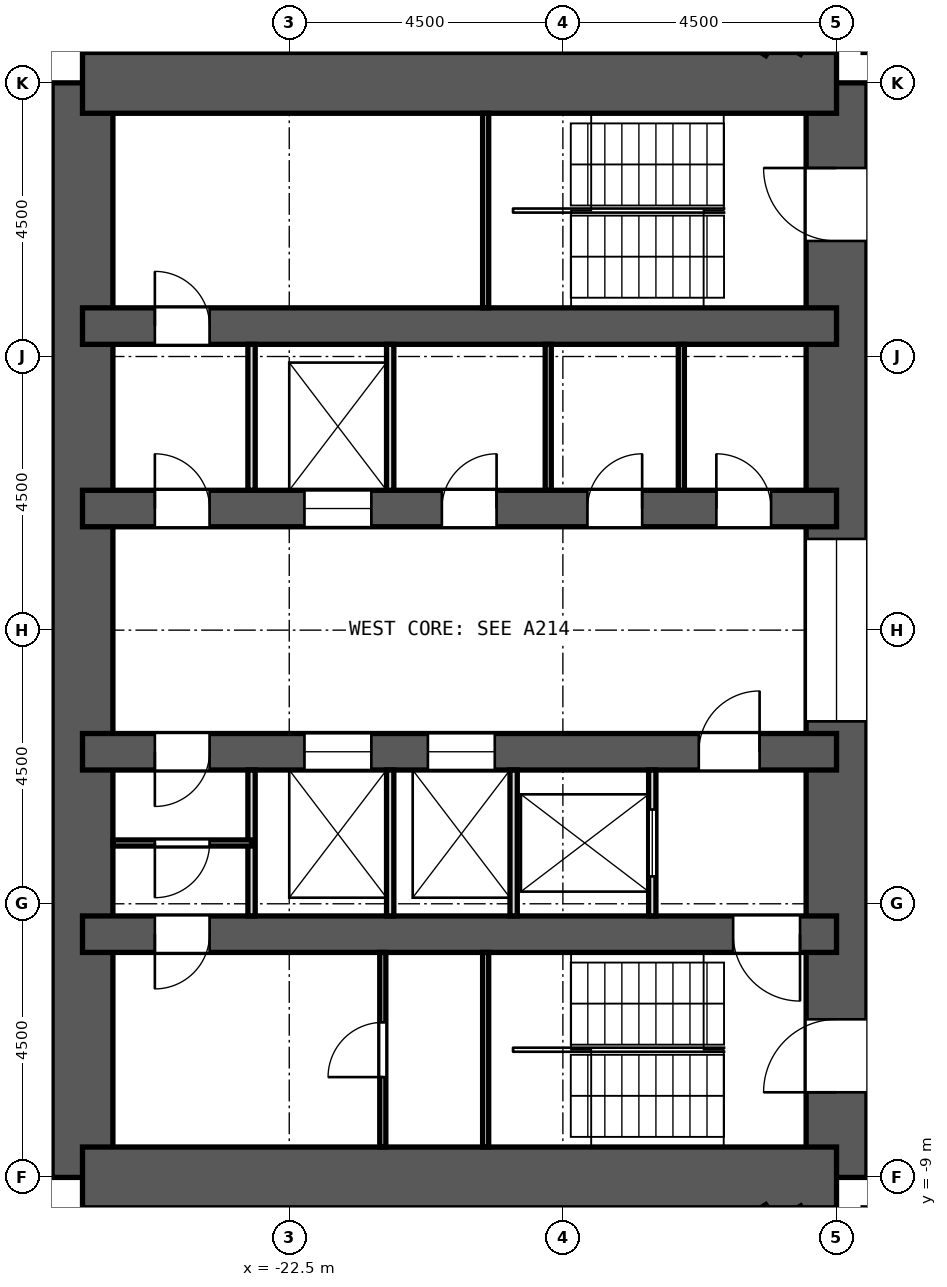
"""IFC4 building model, lengths in metres.
Left out: names, types, materials, properties, quantities, classifications, styles, units other than length and angle.
Written with IfcOpenShell. Run it as: python <this file> out.ifc"""

import sys

from ifc_helpers import new_model, si_unit, direction, frame, frame_2d, origin, place, context, subcontext, project, spatial, rectangle, extrude, element, fill, save


model = new_model("IFC4")
c1 = context("Model", 3, precision=1e-05, world=origin(), true_north=direction((0.0, 1.0)))
c2 = subcontext(c1, "Body", "Model", "MODEL_VIEW")
j1 = project(units=[si_unit("LENGTHUNIT", "METRE"), si_unit("PLANEANGLEUNIT", "RADIAN")], contexts=[c1])
p1 = place(None, origin())
s1 = spatial("IfcSite", under=j1, at=p1, CompositionType="ELEMENT")
p2 = place(p1, origin())
s2 = spatial("IfcBuilding", under=s1, at=p2, CompositionType="ELEMENT")
p3 = place(p2, frame((0.0, 0.0, 75.8)))
s3 = spatial("IfcBuildingStorey", under=s2, at=p3, CompositionType="ELEMENT", Elevation=75.8)
p4 = place(p3, frame((-13.5, -9.0, 0.0), z_axis=(0.0, 0.0, 1.0), x_axis=(0.0, 1.0, 0.0)))
e1 = element("IfcWall", 1, at=p4, inside=s3, PredefinedType="SHEAR", context=c2, shape_type="SweptSolid", body=[
    extrude(rectangle(XDim=18.0, YDim=1.0, at=frame_2d((9.0, 0.0))), origin(), (0.0, 0.0, 1.0), 3.3),
])
p5 = place(p4, frame((15.4, 0.0, 0.0)))
e2 = element("IfcOpeningElement", 2, at=p5, cuts=e1, PredefinedType="OPENING", context=c2, shape_type="SweptSolid", body=[
    extrude(rectangle(XDim=1.2, YDim=2.1, at=frame_2d((0.6, 1.05))), frame((0.0, 0.512, 0.0), z_axis=(0.0, -1.0, 0.0), x_axis=(1.0, 0.0, 0.0)), (0.0, 0.0, 1.0), 1.024),
])
p6 = place(p4, frame((1.4, 0.0, 0.0)))
e3 = element("IfcOpeningElement", 3, at=p6, cuts=e1, PredefinedType="OPENING", context=c2, shape_type="SweptSolid", body=[
    extrude(rectangle(XDim=1.2, YDim=2.1, at=frame_2d((0.6, 1.05))), frame((0.0, 0.512, 0.0), z_axis=(0.0, -1.0, 0.0), x_axis=(1.0, 0.0, 0.0)), (0.0, 0.0, 1.0), 1.024),
])
p7 = place(p4, frame((7.5, 0.0, 0.0)))
e4 = element("IfcOpeningElement", 4, at=p7, cuts=e1, PredefinedType="OPENING", context=c2, shape_type="SweptSolid", body=[
    extrude(rectangle(XDim=3.0, YDim=2.4, at=frame_2d((1.5, 1.2))), frame((0.0, 0.512, 0.0), z_axis=(0.0, -1.0, 0.0), x_axis=(1.0, 0.0, 0.0)), (0.0, 0.0, 1.0), 1.024),
])
p8 = place(p3, frame((-25.9, -9.0, 0.0), z_axis=(0.0, 0.0, 1.0), x_axis=(0.0, 1.0, 0.0)))
e5 = element("IfcWall", 5, at=p8, inside=s3, PredefinedType="SHEAR", context=c2, shape_type="SweptSolid", body=[
    extrude(rectangle(XDim=18.0, YDim=1.0, at=frame_2d((9.0, 0.0))), origin(), (0.0, 0.0, 1.0), 3.3),
])
for number, where, z_axis, x_axis in (
    (6, (-13.5, 9.0, 0.0), (0.0, 0.0, 1.0), (-1.0, 0.0, 0.0)),
    (7, (-13.5, -9.0, 0.0), (0.0, 0.0, 1.0), (-1.0, 0.0, 0.0)),
):
    element("IfcWall", number, at=place(p3, frame(where, z_axis=z_axis, x_axis=x_axis)), inside=s3, PredefinedType="SHEAR", context=c2, shape_type="SweptSolid", body=[
        extrude(rectangle(XDim=12.4, YDim=1.0, at=frame_2d((6.2, 0.0))), origin(), (0.0, 0.0, 1.0), 3.3),
    ])
p9 = place(p3, frame((-13.5, 5.0, 0.0), z_axis=(0.0, 0.0, 1.0), x_axis=(-1.0, 0.0, 0.0)))
e8 = element("IfcWall", 8, at=p9, inside=s3, PredefinedType="SHEAR", context=c2, shape_type="SweptSolid", body=[
    extrude(rectangle(XDim=12.4, YDim=0.6, at=frame_2d((6.2, 0.0))), origin(), (0.0, 0.0, 1.0), 3.3),
])
p10 = place(p9, frame((10.31, 0.0, 0.0)))
e9 = element("IfcOpeningElement", 9, at=p10, cuts=e8, PredefinedType="OPENING", context=c2, shape_type="SweptSolid", body=[
    extrude(rectangle(XDim=0.9, YDim=2.1, at=frame_2d((0.45, 1.05))), frame((0.0, 0.312, 0.0), z_axis=(0.0, -1.0, 0.0), x_axis=(1.0, 0.0, 0.0)), (0.0, 0.0, 1.0), 0.624),
])
p11 = place(p3, frame((-13.5, -5.0, 0.0), z_axis=(0.0, 0.0, 1.0), x_axis=(-1.0, 0.0, 0.0)))
e10 = element("IfcWall", 10, at=p11, inside=s3, PredefinedType="SHEAR", context=c2, shape_type="SweptSolid", body=[
    extrude(rectangle(XDim=12.4, YDim=0.6, at=frame_2d((6.2, 0.0))), origin(), (0.0, 0.0, 1.0), 3.3),
])
p12 = place(p11, frame((10.31, 0.0, 0.0)))
e11 = element("IfcOpeningElement", 11, at=p12, cuts=e10, PredefinedType="OPENING", context=c2, shape_type="SweptSolid", body=[
    extrude(rectangle(XDim=0.9, YDim=2.1, at=frame_2d((0.45, 1.05))), frame((0.0, 0.312, 0.0), z_axis=(0.0, -1.0, 0.0), x_axis=(1.0, 0.0, 0.0)), (0.0, 0.0, 1.0), 0.624),
])
p13 = place(p11, frame((0.6, 0.0, 0.0)))
e12 = element("IfcOpeningElement", 12, at=p13, cuts=e10, PredefinedType="OPENING", context=c2, shape_type="SweptSolid", body=[
    extrude(rectangle(XDim=1.1, YDim=2.1, at=frame_2d((0.55, 1.05))), frame((0.0, 0.312, 0.0), z_axis=(0.0, -1.0, 0.0), x_axis=(1.0, 0.0, 0.0)), (0.0, 0.0, 1.0), 0.624),
])
p14 = place(p3, frame((-13.5, 2.0, 0.0), z_axis=(0.0, 0.0, 1.0), x_axis=(-1.0, 0.0, 0.0)))
e13 = element("IfcWall", 13, at=p14, inside=s3, PredefinedType="SHEAR", context=c2, shape_type="SweptSolid", body=[
    extrude(rectangle(XDim=12.4, YDim=0.6, at=frame_2d((6.2, 0.0))), origin(), (0.0, 0.0, 1.0), 3.3),
])
p15 = place(p14, frame((7.65, 0.0, 0.0)))
e14 = element("IfcOpeningElement", 14, at=p15, cuts=e13, PredefinedType="OPENING", context=c2, shape_type="SweptSolid", body=[
    extrude(rectangle(XDim=1.1, YDim=2.1, at=frame_2d((0.55, 1.05))), frame((0.0, 0.312, 0.0), z_axis=(0.0, -1.0, 0.0), x_axis=(1.0, 0.0, 0.0)), (0.0, 0.0, 1.0), 0.624),
])
p16 = place(p14, frame((1.076, 0.0, 0.0)))
e15 = element("IfcOpeningElement", 15, at=p16, cuts=e13, PredefinedType="OPENING", context=c2, shape_type="SweptSolid", body=[
    extrude(rectangle(XDim=0.9, YDim=2.1, at=frame_2d((0.45, 1.05))), frame((0.0, 0.312, 0.0), z_axis=(0.0, -1.0, 0.0), x_axis=(1.0, 0.0, 0.0)), (0.0, 0.0, 1.0), 0.624),
])
p17 = place(p14, frame((3.196, 0.0, 0.0)))
e16 = element("IfcOpeningElement", 16, at=p17, cuts=e13, PredefinedType="OPENING", context=c2, shape_type="SweptSolid", body=[
    extrude(rectangle(XDim=0.9, YDim=2.1, at=frame_2d((0.45, 1.05))), frame((0.0, 0.312, 0.0), z_axis=(0.0, -1.0, 0.0), x_axis=(1.0, 0.0, 0.0)), (0.0, 0.0, 1.0), 0.624),
])
p18 = place(p14, frame((5.59, 0.0, 0.0)))
e17 = element("IfcOpeningElement", 17, at=p18, cuts=e13, PredefinedType="OPENING", context=c2, shape_type="SweptSolid", body=[
    extrude(rectangle(XDim=0.9, YDim=2.1, at=frame_2d((0.45, 1.05))), frame((0.0, 0.312, 0.0), z_axis=(0.0, -1.0, 0.0), x_axis=(1.0, 0.0, 0.0)), (0.0, 0.0, 1.0), 0.624),
])
p19 = place(p14, frame((10.31, 0.0, 0.0)))
e18 = element("IfcOpeningElement", 18, at=p19, cuts=e13, PredefinedType="OPENING", context=c2, shape_type="SweptSolid", body=[
    extrude(rectangle(XDim=0.9, YDim=2.1, at=frame_2d((0.45, 1.05))), frame((0.0, 0.312, 0.0), z_axis=(0.0, -1.0, 0.0), x_axis=(1.0, 0.0, 0.0)), (0.0, 0.0, 1.0), 0.624),
])
p20 = place(p3, frame((-13.5, -2.0, 0.0), z_axis=(0.0, 0.0, 1.0), x_axis=(-1.0, 0.0, 0.0)))
e19 = element("IfcWall", 19, at=p20, inside=s3, PredefinedType="SHEAR", context=c2, shape_type="SweptSolid", body=[
    extrude(rectangle(XDim=12.4, YDim=0.6, at=frame_2d((6.2, 0.0))), origin(), (0.0, 0.0, 1.0), 3.3),
])
p21 = place(p20, frame((5.62, 0.0, 0.0)))
e20 = element("IfcOpeningElement", 20, at=p21, cuts=e19, PredefinedType="OPENING", context=c2, shape_type="SweptSolid", body=[
    extrude(rectangle(XDim=1.1, YDim=2.1, at=frame_2d((0.55, 1.05))), frame((0.0, 0.312, 0.0), z_axis=(0.0, -1.0, 0.0), x_axis=(1.0, 0.0, 0.0)), (0.0, 0.0, 1.0), 0.624),
])
p22 = place(p20, frame((7.65, 0.0, 0.0)))
e21 = element("IfcOpeningElement", 21, at=p22, cuts=e19, PredefinedType="OPENING", context=c2, shape_type="SweptSolid", body=[
    extrude(rectangle(XDim=1.1, YDim=2.1, at=frame_2d((0.55, 1.05))), frame((0.0, 0.312, 0.0), z_axis=(0.0, -1.0, 0.0), x_axis=(1.0, 0.0, 0.0)), (0.0, 0.0, 1.0), 0.624),
])
p23 = place(p20, frame((1.265, 0.0, 0.0)))
e22 = element("IfcOpeningElement", 22, at=p23, cuts=e19, PredefinedType="OPENING", context=c2, shape_type="SweptSolid", body=[
    extrude(rectangle(XDim=1.0, YDim=2.1, at=frame_2d((0.5, 1.05))), frame((0.0, 0.312, 0.0), z_axis=(0.0, -1.0, 0.0), x_axis=(1.0, 0.0, 0.0)), (0.0, 0.0, 1.0), 0.624),
])
p24 = place(p20, frame((10.31, 0.0, 0.0)))
e23 = element("IfcOpeningElement", 23, at=p24, cuts=e19, PredefinedType="OPENING", context=c2, shape_type="SweptSolid", body=[
    extrude(rectangle(XDim=0.9, YDim=2.1, at=frame_2d((0.45, 1.05))), frame((0.0, 0.312, 0.0), z_axis=(0.0, -1.0, 0.0), x_axis=(1.0, 0.0, 0.0)), (0.0, 0.0, 1.0), 0.624),
])
for number, where, z_axis, x_axis in (
    (24, (-26.208, 11.585, 0.0), (0.0, 0.0, 1.0), (-0.342, -0.94, 0.0)),
    (25, (-27.523, -7.971, 0.0), (0.0, 0.0, 1.0), (0.342, -0.94, 0.0)),
):
    element("IfcWall", number, at=place(p3, frame(where, z_axis=z_axis, x_axis=x_axis)), inside=s3, PredefinedType="SOLIDWALL", context=c2, shape_type="SweptSolid", body=[
        extrude(rectangle(XDim=3.846, YDim=0.6, at=frame_2d((1.923, 0.0))), origin(), (0.0, 0.0, 1.0), 2.75),
    ])
p25 = place(p3, frame((-14.145, -9.5, 0.0), z_axis=(0.0, 0.0, 1.0), x_axis=(0.500012531179, -0.866018168784, 0.0)))
e26 = element("IfcWall", 26, at=p25, inside=s3, PredefinedType="PARTITIONING", context=c2, shape_type="SweptSolid", body=[
    extrude(rectangle(XDim=2.21, YDim=0.125, at=frame_2d((1.105, 0.0))), origin(), (0.0, 0.0, 1.0), 2.75),
])
p26 = place(p3, frame((-16.293, 10.58, 0.0), z_axis=(0.0, 0.0, 1.0), x_axis=(0.838803325008, -0.544434552499, 0.0)))
e27 = element("IfcWall", 27, at=p26, inside=s3, PredefinedType="PARTITIONING", context=c2, shape_type="SweptSolid", body=[
    extrude(rectangle(XDim=1.984, YDim=0.125, at=frame_2d((0.992, 0.0))), origin(), (0.0, 0.0, 1.0), 2.75),
])
p27 = place(p3, frame((-16.24, -10.546, 0.0), z_axis=(0.0, 0.0, 1.0), x_axis=(0.838829547553, 0.544394149631, 0.0)))
e28 = element("IfcWall", 28, at=p27, inside=s3, PredefinedType="PARTITIONING", context=c2, shape_type="SweptSolid", body=[
    extrude(rectangle(XDim=1.921, YDim=0.125, at=frame_2d((0.96, 0.0))), origin(), (0.0, 0.0, 1.0), 2.75),
])
p28 = place(p3, frame((-14.145, 9.5, 0.0), z_axis=(0.0, 0.0, 1.0), x_axis=(0.500012531179, 0.866018168784, 0.0)))
e29 = element("IfcWall", 29, at=p28, inside=s3, PredefinedType="PARTITIONING", context=c2, shape_type="SweptSolid", body=[
    extrude(rectangle(XDim=2.21, YDim=0.125, at=frame_2d((1.105, 0.0))), origin(), (0.0, 0.0, 1.0), 2.75),
])
for number, where, z_axis, x_axis in (
    (30, (-16.052, 2.3, 0.0), (0.0, 0.0, 1.0), (0.0, 1.0, 0.0)),
    (31, (-18.241, 2.3, 0.0), (0.0, 0.0, 1.0), (0.0, 1.0, 0.0)),
):
    element("IfcWall", number, at=place(p3, frame(where, z_axis=z_axis, x_axis=x_axis)), inside=s3, PredefinedType="PARTITIONING", context=c2, shape_type="SweptSolid", body=[
        extrude(rectangle(XDim=2.4, YDim=0.1, at=frame_2d((1.2, 0.0))), origin(), (0.0, 0.0, 1.0), 2.75),
    ])
for number, where, z_axis, x_axis in (
    (32, (-20.84, 2.3, 0.0), (0.0, 0.0, 1.0), (0.0, 1.0, 0.0)),
    (33, (-23.12, 2.3, 0.0), (0.0, 0.0, 1.0), (0.0, 1.0, 0.0)),
):
    element("IfcWall", number, at=place(p3, frame(where, z_axis=z_axis, x_axis=x_axis)), inside=s3, PredefinedType="PARTITIONING", context=c2, shape_type="SweptSolid", body=[
        extrude(rectangle(XDim=2.4, YDim=0.12, at=frame_2d((1.2, 0.0))), origin(), (0.0, 0.0, 1.0), 2.75),
    ])
p29 = place(p3, frame((-16.53, -4.7, 0.0), z_axis=(0.0, 0.0, 1.0), x_axis=(0.0, 1.0, 0.0)))
e34 = element("IfcWall", 34, at=p29, inside=s3, PredefinedType="PARTITIONING", context=c2, shape_type="SweptSolid", body=[
    extrude(rectangle(XDim=2.4, YDim=0.12, at=frame_2d((1.2, 0.0))), origin(), (0.0, 0.0, 1.0), 2.75),
])
p30 = place(p29, frame((0.65, 0.0, 0.0)))
e35 = element("IfcOpeningElement", 35, at=p30, cuts=e34, PredefinedType="OPENING", context=c2, shape_type="SweptSolid", body=[
    extrude(rectangle(XDim=1.1, YDim=2.1, at=frame_2d((0.55, 1.05))), frame((0.0, 0.072, 0.0), z_axis=(0.0, -1.0, 0.0), x_axis=(1.0, 0.0, 0.0)), (0.0, 0.0, 1.0), 0.144),
])
for number, where, z_axis, x_axis in (
    (36, (-18.81, -4.7, 0.0), (0.0, 0.0, 1.0), (0.0, 1.0, 0.0)),
    (37, (-20.84, -4.7, 0.0), (0.0, 0.0, 1.0), (0.0, 1.0, 0.0)),
    (38, (-23.12, -4.7, 0.0), (0.0, 0.0, 1.0), (0.0, 1.0, 0.0)),
):
    element("IfcWall", number, at=place(p3, frame(where, z_axis=z_axis, x_axis=x_axis)), inside=s3, PredefinedType="PARTITIONING", context=c2, shape_type="SweptSolid", body=[
        extrude(rectangle(XDim=2.4, YDim=0.12, at=frame_2d((1.2, 0.0))), origin(), (0.0, 0.0, 1.0), 2.75),
    ])
p31 = place(p3, frame((-23.12, -3.5, 0.0), z_axis=(0.0, 0.0, 1.0), x_axis=(-1.0, 0.0, 0.0)))
e39 = element("IfcWall", 39, at=p31, inside=s3, PredefinedType="PARTITIONING", context=c2, shape_type="SweptSolid", body=[
    extrude(rectangle(XDim=2.28, YDim=0.1, at=frame_2d((1.14, 0.0))), origin(), (0.0, 0.0, 1.0), 2.75),
])
p32 = place(p31, frame((0.69, 0.0, 0.0)))
e40 = element("IfcOpeningElement", 40, at=p32, cuts=e39, PredefinedType="OPENING", context=c2, shape_type="SweptSolid", body=[
    extrude(rectangle(XDim=0.9, YDim=2.1, at=frame_2d((0.45, 1.05))), frame((0.0, 0.062, 0.0), z_axis=(0.0, -1.0, 0.0), x_axis=(1.0, 0.0, 0.0)), (0.0, 0.0, 1.0), 0.124),
])
for number, where, z_axis, x_axis in (
    (41, (-19.27, 5.3, 0.0), (0.0, 0.0, 1.0), (0.0, 1.0, 0.0)),
    (42, (-19.27, -8.5, 0.0), (0.0, 0.0, 1.0), (0.0, 1.0, 0.0)),
):
    element("IfcWall", number, at=place(p3, frame(where, z_axis=z_axis, x_axis=x_axis)), inside=s3, PredefinedType="PARTITIONING", context=c2, shape_type="SweptSolid", body=[
        extrude(rectangle(XDim=3.2, YDim=0.1, at=frame_2d((1.6, 0.0))), origin(), (0.0, 0.0, 1.0), 2.75),
    ])
p33 = place(p3, frame((-20.962, -8.5, 0.0), z_axis=(0.0, 0.0, 1.0), x_axis=(0.0, 1.0, 0.0)))
e43 = element("IfcWall", 43, at=p33, inside=s3, PredefinedType="PARTITIONING", context=c2, shape_type="SweptSolid", body=[
    extrude(rectangle(XDim=3.2, YDim=0.1, at=frame_2d((1.6, 0.0))), origin(), (0.0, 0.0, 1.0), 2.75),
])
p34 = place(p33, frame((1.15, 0.0, 0.0)))
e44 = element("IfcOpeningElement", 44, at=p34, cuts=e43, PredefinedType="OPENING", context=c2, shape_type="SweptSolid", body=[
    extrude(rectangle(XDim=0.9, YDim=2.1, at=frame_2d((0.45, 1.05))), frame((0.0, 0.062, 0.0), z_axis=(0.0, -1.0, 0.0), x_axis=(1.0, 0.0, 0.0)), (0.0, 0.0, 1.0), 0.124),
])
p35 = place(p15, origin())
e45 = element("IfcDoor", 45, at=p35, inside=s3, OperationType="DOUBLE_DOOR_SLIDING", PredefinedType="DOOR", context=c2, shape_type="SweptSolid", body=[
    extrude(rectangle(XDim=1.1, YDim=2.1, at=frame_2d((0.55, 1.05))), frame((0.0, 0.025, 0.0), z_axis=(0.0, -1.0, 0.0), x_axis=(1.0, 0.0, 0.0)), (0.0, 0.0, 1.0), 0.05),
])
fill(e14, e45)
p36 = place(p30, origin())
e46 = element("IfcDoor", 46, at=p36, inside=s3, OperationType="DOUBLE_DOOR_SLIDING", PredefinedType="DOOR", context=c2, shape_type="SweptSolid", body=[
    extrude(rectangle(XDim=1.1, YDim=2.1, at=frame_2d((0.55, 1.05))), frame((0.0, 0.025, 0.0), z_axis=(0.0, -1.0, 0.0), x_axis=(1.0, 0.0, 0.0)), (0.0, 0.0, 1.0), 0.05),
])
fill(e35, e46)
p37 = place(p21, origin())
e47 = element("IfcDoor", 47, at=p37, inside=s3, OperationType="DOUBLE_DOOR_SLIDING", PredefinedType="DOOR", context=c2, shape_type="SweptSolid", body=[
    extrude(rectangle(XDim=1.1, YDim=2.1, at=frame_2d((0.55, 1.05))), frame((0.0, 0.025, 0.0), z_axis=(0.0, -1.0, 0.0), x_axis=(1.0, 0.0, 0.0)), (0.0, 0.0, 1.0), 0.05),
])
fill(e20, e47)
p38 = place(p22, origin())
e48 = element("IfcDoor", 48, at=p38, inside=s3, OperationType="DOUBLE_DOOR_SLIDING", PredefinedType="DOOR", context=c2, shape_type="SweptSolid", body=[
    extrude(rectangle(XDim=1.1, YDim=2.1, at=frame_2d((0.55, 1.05))), frame((0.0, 0.025, 0.0), z_axis=(0.0, -1.0, 0.0), x_axis=(1.0, 0.0, 0.0)), (0.0, 0.0, 1.0), 0.05),
])
fill(e21, e48)
p39 = place(p16, frame((0.9, 0.0, 0.0), z_axis=(0.0, 0.0, 1.0), x_axis=(-1.0, 0.0, 0.0)))
e49 = element("IfcDoor", 49, at=p39, inside=s3, OperationType="SINGLE_SWING_LEFT", PredefinedType="DOOR", context=c2, shape_type="SweptSolid", body=[
    extrude(rectangle(XDim=0.9, YDim=2.1, at=frame_2d((0.45, 1.05))), frame((0.0, 0.025, 0.0), z_axis=(0.0, -1.0, 0.0), x_axis=(1.0, 0.0, 0.0)), (0.0, 0.0, 1.0), 0.05),
])
fill(e15, e49)
p40 = place(p17, frame((0.9, 0.0, 0.0), z_axis=(0.0, 0.0, 1.0), x_axis=(-1.0, 0.0, 0.0)))
e50 = element("IfcDoor", 50, at=p40, inside=s3, OperationType="SINGLE_SWING_RIGHT", PredefinedType="DOOR", context=c2, shape_type="SweptSolid", body=[
    extrude(rectangle(XDim=0.9, YDim=2.1, at=frame_2d((0.45, 1.05))), frame((0.0, 0.025, 0.0), z_axis=(0.0, -1.0, 0.0), x_axis=(1.0, 0.0, 0.0)), (0.0, 0.0, 1.0), 0.05),
])
fill(e16, e50)
p41 = place(p18, frame((0.9, 0.0, 0.0), z_axis=(0.0, 0.0, 1.0), x_axis=(-1.0, 0.0, 0.0)))
e51 = element("IfcDoor", 51, at=p41, inside=s3, OperationType="SINGLE_SWING_RIGHT", PredefinedType="DOOR", context=c2, shape_type="SweptSolid", body=[
    extrude(rectangle(XDim=0.9, YDim=2.1, at=frame_2d((0.45, 1.05))), frame((0.0, 0.025, 0.0), z_axis=(0.0, -1.0, 0.0), x_axis=(1.0, 0.0, 0.0)), (0.0, 0.0, 1.0), 0.05),
])
fill(e17, e51)
p42 = place(p19, frame((0.9, 0.0, 0.0), z_axis=(0.0, 0.0, 1.0), x_axis=(-1.0, 0.0, 0.0)))
e52 = element("IfcDoor", 52, at=p42, inside=s3, OperationType="SINGLE_SWING_LEFT", PredefinedType="DOOR", context=c2, shape_type="SweptSolid", body=[
    extrude(rectangle(XDim=0.9, YDim=2.1, at=frame_2d((0.45, 1.05))), frame((0.0, 0.025, 0.0), z_axis=(0.0, -1.0, 0.0), x_axis=(1.0, 0.0, 0.0)), (0.0, 0.0, 1.0), 0.05),
])
fill(e18, e52)
p43 = place(p23, frame((1.0, 0.0, 0.0), z_axis=(0.0, 0.0, 1.0), x_axis=(-1.0, 0.0, 0.0)))
e53 = element("IfcDoor", 53, at=p43, inside=s3, OperationType="SINGLE_SWING_RIGHT", PredefinedType="DOOR", context=c2, shape_type="SweptSolid", body=[
    extrude(rectangle(XDim=1.0, YDim=2.1, at=frame_2d((0.5, 1.05))), frame((0.0, 0.025, 0.0), z_axis=(0.0, -1.0, 0.0), x_axis=(1.0, 0.0, 0.0)), (0.0, 0.0, 1.0), 0.05),
])
fill(e22, e53)
p44 = place(p24, origin())
e54 = element("IfcDoor", 54, at=p44, inside=s3, OperationType="SINGLE_SWING_RIGHT", PredefinedType="DOOR", context=c2, shape_type="SweptSolid", body=[
    extrude(rectangle(XDim=0.9, YDim=2.1, at=frame_2d((0.45, 1.05))), frame((0.0, 0.025, 0.0), z_axis=(0.0, -1.0, 0.0), x_axis=(1.0, 0.0, 0.0)), (0.0, 0.0, 1.0), 0.05),
])
fill(e23, e54)
p45 = place(p10, frame((0.9, 0.0, 0.0), z_axis=(0.0, 0.0, 1.0), x_axis=(-1.0, 0.0, 0.0)))
e55 = element("IfcDoor", 55, at=p45, inside=s3, OperationType="SINGLE_SWING_LEFT", PredefinedType="DOOR", context=c2, shape_type="SweptSolid", body=[
    extrude(rectangle(XDim=0.9, YDim=2.1, at=frame_2d((0.45, 1.05))), frame((0.0, 0.025, 0.0), z_axis=(0.0, -1.0, 0.0), x_axis=(1.0, 0.0, 0.0)), (0.0, 0.0, 1.0), 0.05),
])
fill(e9, e55)
p46 = place(p32, origin())
e56 = element("IfcDoor", 56, at=p46, inside=s3, OperationType="SINGLE_SWING_RIGHT", PredefinedType="DOOR", context=c2, shape_type="SweptSolid", body=[
    extrude(rectangle(XDim=0.9, YDim=2.1, at=frame_2d((0.45, 1.05))), frame((0.0, 0.025, 0.0), z_axis=(0.0, -1.0, 0.0), x_axis=(1.0, 0.0, 0.0)), (0.0, 0.0, 1.0), 0.05),
])
fill(e40, e56)
p47 = place(p34, origin())
e57 = element("IfcDoor", 57, at=p47, inside=s3, OperationType="SINGLE_SWING_LEFT", PredefinedType="DOOR", context=c2, shape_type="SweptSolid", body=[
    extrude(rectangle(XDim=0.9, YDim=2.1, at=frame_2d((0.45, 1.05))), frame((0.0, 0.025, 0.0), z_axis=(0.0, -1.0, 0.0), x_axis=(1.0, 0.0, 0.0)), (0.0, 0.0, 1.0), 0.05),
])
fill(e44, e57)
p48 = place(p12, origin())
e58 = element("IfcDoor", 58, at=p48, inside=s3, OperationType="SINGLE_SWING_RIGHT", PredefinedType="DOOR", context=c2, shape_type="SweptSolid", body=[
    extrude(rectangle(XDim=0.9, YDim=2.1, at=frame_2d((0.45, 1.05))), frame((0.0, 0.025, 0.0), z_axis=(0.0, -1.0, 0.0), x_axis=(1.0, 0.0, 0.0)), (0.0, 0.0, 1.0), 0.05),
])
fill(e11, e58)
p49 = place(p13, origin())
e59 = element("IfcDoor", 59, at=p49, inside=s3, OperationType="SINGLE_SWING_LEFT", PredefinedType="DOOR", context=c2, shape_type="SweptSolid", body=[
    extrude(rectangle(XDim=1.1, YDim=2.1, at=frame_2d((0.55, 1.05))), frame((0.0, 0.025, 0.0), z_axis=(0.0, -1.0, 0.0), x_axis=(1.0, 0.0, 0.0)), (0.0, 0.0, 1.0), 0.05),
])
fill(e12, e59)
p50 = place(p5, origin())
e60 = element("IfcDoor", 60, at=p50, inside=s3, OperationType="SINGLE_SWING_RIGHT", PredefinedType="DOOR", context=c2, shape_type="SweptSolid", body=[
    extrude(rectangle(XDim=1.2, YDim=2.1, at=frame_2d((0.6, 1.05))), frame((0.0, 0.025, 0.0), z_axis=(0.0, -1.0, 0.0), x_axis=(1.0, 0.0, 0.0)), (0.0, 0.0, 1.0), 0.05),
])
fill(e2, e60)
p51 = place(p6, origin())
e61 = element("IfcDoor", 61, at=p51, inside=s3, OperationType="SINGLE_SWING_LEFT", PredefinedType="DOOR", context=c2, shape_type="SweptSolid", body=[
    extrude(rectangle(XDim=1.2, YDim=2.1, at=frame_2d((0.6, 1.05))), frame((0.0, 0.025, 0.0), z_axis=(0.0, -1.0, 0.0), x_axis=(1.0, 0.0, 0.0)), (0.0, 0.0, 1.0), 0.05),
])
fill(e3, e61)
p52 = place(p7, origin())
e62 = element("IfcDoor", 62, at=p52, inside=s3, OperationType="DOUBLE_DOOR_SLIDING", PredefinedType="DOOR", context=c2, shape_type="SweptSolid", body=[
    extrude(rectangle(XDim=3.0, YDim=2.4, at=frame_2d((1.5, 1.2))), frame((0.0, 0.025, 0.0), z_axis=(0.0, -1.0, 0.0), x_axis=(1.0, 0.0, 0.0)), (0.0, 0.0, 1.0), 0.05),
])
fill(e4, e62)
save(model, sys.argv[1])
